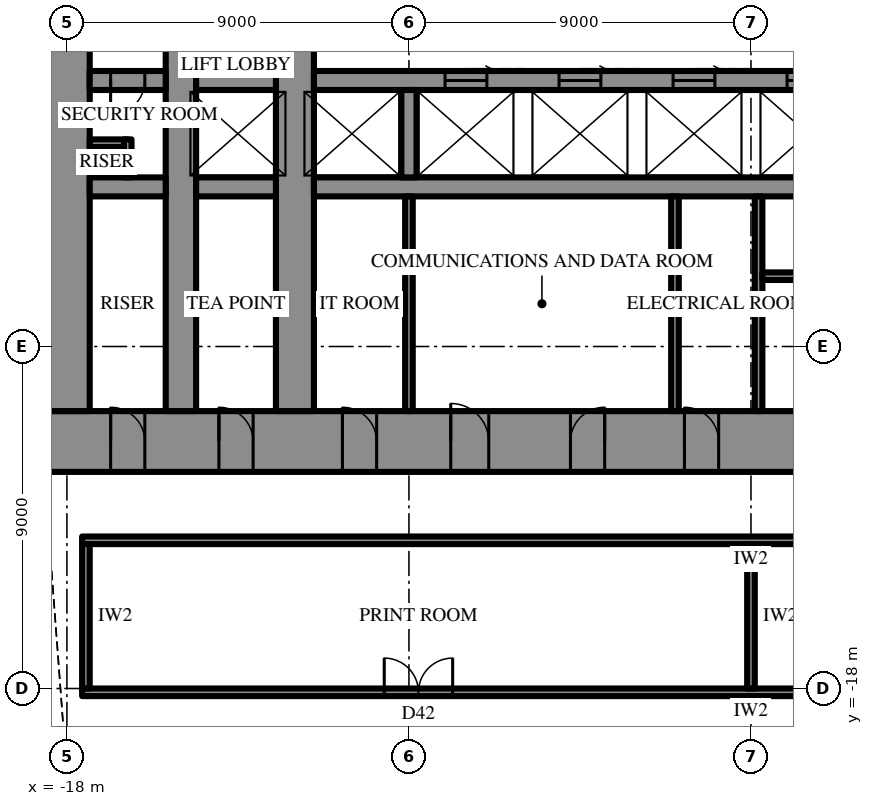
"""IFC4 building model, lengths in metres.
Left out: names, types, materials, properties, quantities, classifications, styles, units other than length and angle.
Written with IfcOpenShell. Run it as: python <this file> out.ifc"""

import sys

from ifc_helpers import new_model, si_unit, direction, frame, frame_2d, origin, place, context, subcontext, project, spatial, rectangle, extrude, element, fill, save


model = new_model("IFC4")
c1 = context("Model", 3, precision=1e-05, world=origin(), true_north=direction((0.0, 1.0)))
c2 = subcontext(c1, "Body", "Model", "MODEL_VIEW")
j1 = project(units=[si_unit("LENGTHUNIT", "METRE"), si_unit("PLANEANGLEUNIT", "RADIAN")], contexts=[c1])
p1 = place(None, origin())
s1 = spatial("IfcSite", under=j1, at=p1, CompositionType="ELEMENT")
p2 = place(p1, origin())
s2 = spatial("IfcBuilding", under=s1, at=p2, CompositionType="ELEMENT")
p3 = place(p2, frame((0.0, 0.0, 199.3)))
s3 = spatial("IfcBuildingStorey", under=s2, at=p3, CompositionType="ELEMENT", Elevation=199.3)
p4 = place(p3, frame((18.6, -11.5, 0.0), z_axis=(0.0, 0.0, 1.0), x_axis=(-1.0, 0.0, 0.0)))
e1 = element("IfcWall", 1, at=p4, inside=s3, PredefinedType="SHEAR", context=c2, shape_type="SweptSolid", body=[
    extrude(rectangle(XDim=37.2, YDim=1.6, at=frame_2d((18.6, 0.0))), origin(), (0.0, 0.0, 1.0), 4.2),
])
p5 = place(p4, frame((19.45, 0.0, 0.0)))
e2 = element("IfcOpeningElement", 2, at=p5, cuts=e1, PredefinedType="OPENING", context=c2, shape_type="SweptSolid", body=[
    extrude(rectangle(XDim=0.9, YDim=2.2, at=frame_2d((0.45, 1.1))), frame((0.0, 0.81, 0.0), z_axis=(0.0, -1.0, 0.0), x_axis=(1.0, 0.0, 0.0)), (0.0, 0.0, 1.0), 1.62),
])
p6 = place(p4, frame((22.45, 0.0, 0.0)))
e3 = element("IfcOpeningElement", 3, at=p6, cuts=e1, PredefinedType="OPENING", context=c2, shape_type="SweptSolid", body=[
    extrude(rectangle(XDim=0.9, YDim=2.2, at=frame_2d((0.45, 1.1))), frame((0.0, 0.81, 0.0), z_axis=(0.0, -1.0, 0.0), x_axis=(1.0, 0.0, 0.0)), (0.0, 0.0, 1.0), 1.62),
])
p7 = place(p4, frame((25.5, 0.0, 0.0)))
e4 = element("IfcOpeningElement", 4, at=p7, cuts=e1, PredefinedType="OPENING", context=c2, shape_type="SweptSolid", body=[
    extrude(rectangle(XDim=1.0, YDim=2.2, at=frame_2d((0.5, 1.1))), frame((0.0, 0.81, 0.0), z_axis=(0.0, -1.0, 0.0), x_axis=(1.0, 0.0, 0.0)), (0.0, 0.0, 1.0), 1.62),
])
p8 = place(p4, frame((1.75, 0.0, 0.0)))
e5 = element("IfcOpeningElement", 5, at=p8, cuts=e1, PredefinedType="OPENING", context=c2, shape_type="SweptSolid", body=[
    extrude(rectangle(XDim=0.9, YDim=2.2, at=frame_2d((0.45, 1.1))), frame((0.0, 0.81, 0.0), z_axis=(0.0, -1.0, 0.0), x_axis=(1.0, 0.0, 0.0)), (0.0, 0.0, 1.0), 1.62),
])
p9 = place(p4, frame((4.6, 0.0, 0.0)))
e6 = element("IfcOpeningElement", 6, at=p9, cuts=e1, PredefinedType="OPENING", context=c2, shape_type="SweptSolid", body=[
    extrude(rectangle(XDim=0.9, YDim=2.2, at=frame_2d((0.45, 1.1))), frame((0.0, 0.81, 0.0), z_axis=(0.0, -1.0, 0.0), x_axis=(1.0, 0.0, 0.0)), (0.0, 0.0, 1.0), 1.62),
])
p10 = place(p4, frame((7.85, 0.0, 0.0)))
e7 = element("IfcOpeningElement", 7, at=p10, cuts=e1, PredefinedType="OPENING", context=c2, shape_type="SweptSolid", body=[
    extrude(rectangle(XDim=0.9, YDim=2.2, at=frame_2d((0.45, 1.1))), frame((0.0, 0.81, 0.0), z_axis=(0.0, -1.0, 0.0), x_axis=(1.0, 0.0, 0.0)), (0.0, 0.0, 1.0), 1.62),
])
p11 = place(p4, frame((28.45, 0.0, 0.0)))
e8 = element("IfcOpeningElement", 8, at=p11, cuts=e1, PredefinedType="OPENING", context=c2, shape_type="SweptSolid", body=[
    extrude(rectangle(XDim=0.9, YDim=2.2, at=frame_2d((0.45, 1.1))), frame((0.0, 0.81, 0.0), z_axis=(0.0, -1.0, 0.0), x_axis=(1.0, 0.0, 0.0)), (0.0, 0.0, 1.0), 1.62),
])
p12 = place(p4, frame((31.7, 0.0, 0.0)))
e9 = element("IfcOpeningElement", 9, at=p12, cuts=e1, PredefinedType="OPENING", context=c2, shape_type="SweptSolid", body=[
    extrude(rectangle(XDim=0.9, YDim=2.2, at=frame_2d((0.45, 1.1))), frame((0.0, 0.81, 0.0), z_axis=(0.0, -1.0, 0.0), x_axis=(1.0, 0.0, 0.0)), (0.0, 0.0, 1.0), 1.62),
])
p13 = place(p4, frame((34.55, 0.0, 0.0)))
e10 = element("IfcOpeningElement", 10, at=p13, cuts=e1, PredefinedType="OPENING", context=c2, shape_type="SweptSolid", body=[
    extrude(rectangle(XDim=0.9, YDim=2.2, at=frame_2d((0.45, 1.1))), frame((0.0, 0.81, 0.0), z_axis=(0.0, -1.0, 0.0), x_axis=(1.0, 0.0, 0.0)), (0.0, 0.0, 1.0), 1.62),
])
p14 = place(p3, frame((-18.0, 10.7, 0.0), z_axis=(0.0, 0.0, 1.0), x_axis=(0.0, -1.0, 0.0)))
e11 = element("IfcWall", 11, at=p14, inside=s3, PredefinedType="SHEAR", context=c2, shape_type="SweptSolid", body=[
    extrude(rectangle(XDim=21.4, YDim=1.2, at=frame_2d((10.7, 0.0))), origin(), (0.0, 0.0, 1.0), 4.2),
])
p15 = place(p14, frame((9.8, 0.0, 0.0)))
e12 = element("IfcOpeningElement", 12, at=p15, cuts=e11, PredefinedType="OPENING", context=c2, shape_type="SweptSolid", body=[
    extrude(rectangle(XDim=1.8, YDim=2.4, at=frame_2d((0.9, 1.2))), frame((0.0, 0.61, 0.0), z_axis=(0.0, -1.0, 0.0), x_axis=(1.0, 0.0, 0.0)), (0.0, 0.0, 1.0), 1.22),
])
p16 = place(p3, frame((-12.0, -10.7, 0.0), z_axis=(0.0, 0.0, 1.0), x_axis=(0.0, 1.0, 0.0)))
e13 = element("IfcWall", 13, at=p16, inside=s3, PredefinedType="SHEAR", context=c2, shape_type="SweptSolid", body=[
    extrude(rectangle(XDim=21.4, YDim=1.0, at=frame_2d((10.7, 0.0))), origin(), (0.0, 0.0, 1.0), 4.2),
])
p17 = place(p16, frame((9.8, 0.0, 0.0)))
e14 = element("IfcOpeningElement", 14, at=p17, cuts=e13, PredefinedType="OPENING", context=c2, shape_type="SweptSolid", body=[
    extrude(rectangle(XDim=1.8, YDim=2.4, at=frame_2d((0.9, 1.2))), frame((0.0, 0.51, 0.0), z_axis=(0.0, -1.0, 0.0), x_axis=(1.0, 0.0, 0.0)), (0.0, 0.0, 1.0), 1.02),
])
p18 = place(p3, frame((-15.0, -10.7, 0.0), z_axis=(0.0, 0.0, 1.0), x_axis=(0.0, 1.0, 0.0)))
e15 = element("IfcWall", 15, at=p18, inside=s3, PredefinedType="SHEAR", context=c2, shape_type="SweptSolid", body=[
    extrude(rectangle(XDim=21.4, YDim=0.8, at=frame_2d((10.7, 0.0))), origin(), (0.0, 0.0, 1.0), 4.2),
])
p19 = place(p18, frame((9.8, 0.0, 0.0)))
e16 = element("IfcOpeningElement", 16, at=p19, cuts=e15, PredefinedType="OPENING", context=c2, shape_type="SweptSolid", body=[
    extrude(rectangle(XDim=1.8, YDim=2.4, at=frame_2d((0.9, 1.2))), frame((0.0, 0.41, 0.0), z_axis=(0.0, -1.0, 0.0), x_axis=(1.0, 0.0, 0.0)), (0.0, 0.0, 1.0), 0.82),
])
p20 = place(p3, frame((3.2, -2.0, 0.0), z_axis=(0.0, 0.0, 1.0), x_axis=(-1.0, 0.0, 0.0)))
e17 = element("IfcWall", 17, at=p20, inside=s3, PredefinedType="SHEAR", context=c2, shape_type="SweptSolid", body=[
    extrude(rectangle(XDim=14.7, YDim=0.5, at=frame_2d((7.35, 0.0))), origin(), (0.0, 0.0, 1.0), 4.2),
])
p21 = place(p20, frame((1.15, 0.0, 0.0)))
e18 = element("IfcOpeningElement", 18, at=p21, cuts=e17, PredefinedType="OPENING", context=c2, shape_type="SweptSolid", body=[
    extrude(rectangle(XDim=1.1, YDim=2.2, at=frame_2d((0.55, 1.1))), frame((0.0, 0.26, 0.0), z_axis=(0.0, -1.0, 0.0), x_axis=(1.0, 0.0, 0.0)), (0.0, 0.0, 1.0), 0.52),
])
p22 = place(p20, frame((4.15, 0.0, 0.0)))
e19 = element("IfcOpeningElement", 19, at=p22, cuts=e17, PredefinedType="OPENING", context=c2, shape_type="SweptSolid", body=[
    extrude(rectangle(XDim=1.1, YDim=2.2, at=frame_2d((0.55, 1.1))), frame((0.0, 0.26, 0.0), z_axis=(0.0, -1.0, 0.0), x_axis=(1.0, 0.0, 0.0)), (0.0, 0.0, 1.0), 0.52),
])
p23 = place(p20, frame((7.15, 0.0, 0.0)))
e20 = element("IfcOpeningElement", 20, at=p23, cuts=e17, PredefinedType="OPENING", context=c2, shape_type="SweptSolid", body=[
    extrude(rectangle(XDim=1.1, YDim=2.2, at=frame_2d((0.55, 1.1))), frame((0.0, 0.26, 0.0), z_axis=(0.0, -1.0, 0.0), x_axis=(1.0, 0.0, 0.0)), (0.0, 0.0, 1.0), 0.52),
])
p24 = place(p20, frame((10.15, 0.0, 0.0)))
e21 = element("IfcOpeningElement", 21, at=p24, cuts=e17, PredefinedType="OPENING", context=c2, shape_type="SweptSolid", body=[
    extrude(rectangle(XDim=1.1, YDim=2.2, at=frame_2d((0.55, 1.1))), frame((0.0, 0.26, 0.0), z_axis=(0.0, -1.0, 0.0), x_axis=(1.0, 0.0, 0.0)), (0.0, 0.0, 1.0), 0.52),
])
p25 = place(p3, frame((-12.5, -2.0, 0.0), z_axis=(0.0, 0.0, 1.0), x_axis=(-1.0, 0.0, 0.0)))
e22 = element("IfcWall", 22, at=p25, inside=s3, PredefinedType="SHEAR", context=c2, shape_type="SweptSolid", body=[
    extrude(rectangle(XDim=2.1, YDim=0.5, at=frame_2d((1.05, 0.0))), origin(), (0.0, 0.0, 1.0), 4.2),
])
p26 = place(p3, frame((-15.4, -2.0, 0.0), z_axis=(0.0, 0.0, 1.0), x_axis=(-1.0, 0.0, 0.0)))
e23 = element("IfcWall", 23, at=p26, inside=s3, PredefinedType="SHEAR", context=c2, shape_type="SweptSolid", body=[
    extrude(rectangle(XDim=2.0, YDim=0.5, at=frame_2d((1.0, 0.0))), origin(), (0.0, 0.0, 1.0), 4.2),
])
p27 = place(p26, frame((0.55, 0.0, 0.0)))
e24 = element("IfcOpeningElement", 24, at=p27, cuts=e23, PredefinedType="OPENING", context=c2, shape_type="SweptSolid", body=[
    extrude(rectangle(XDim=0.9, YDim=2.2, at=frame_2d((0.45, 1.1))), frame((0.0, 0.26, 0.0), z_axis=(0.0, -1.0, 0.0), x_axis=(1.0, 0.0, 0.0)), (0.0, 0.0, 1.0), 0.52),
])
p28 = place(p3, frame((11.5, -4.8, 0.0), z_axis=(0.0, 0.0, 1.0), x_axis=(-1.0, 0.0, 0.0)))
e25 = element("IfcWall", 25, at=p28, inside=s3, PredefinedType="SHEAR", context=c2, shape_type="SweptSolid", body=[
    extrude(rectangle(XDim=23.0, YDim=0.5, at=frame_2d((11.5, 0.0))), origin(), (0.0, 0.0, 1.0), 4.2),
])
p29 = place(p28, frame((6.4, 0.0, 0.0)))
e26 = element("IfcOpeningElement", 26, at=p29, cuts=e25, PredefinedType="OPENING", context=c2, shape_type="SweptSolid", body=[
    extrude(rectangle(XDim=1.2, YDim=2.2, at=frame_2d((0.6, 1.1))), frame((0.0, 0.26, 0.0), z_axis=(0.0, -1.0, 0.0), x_axis=(1.0, 0.0, 0.0)), (0.0, 0.0, 1.0), 0.52),
])
p30 = place(p28, frame((3.4, 0.0, 0.0)))
e27 = element("IfcOpeningElement", 27, at=p30, cuts=e25, PredefinedType="OPENING", context=c2, shape_type="SweptSolid", body=[
    extrude(rectangle(XDim=1.2, YDim=2.2, at=frame_2d((0.6, 1.1))), frame((0.0, 0.26, 0.0), z_axis=(0.0, -1.0, 0.0), x_axis=(1.0, 0.0, 0.0)), (0.0, 0.0, 1.0), 0.52),
])
p31 = place(p3, frame((-12.5, -4.8, 0.0), z_axis=(0.0, 0.0, 1.0), x_axis=(-1.0, 0.0, 0.0)))
e28 = element("IfcWall", 28, at=p31, inside=s3, PredefinedType="SHEAR", context=c2, shape_type="SweptSolid", body=[
    extrude(rectangle(XDim=2.1, YDim=0.5, at=frame_2d((1.05, 0.0))), origin(), (0.0, 0.0, 1.0), 4.2),
])
p32 = place(p3, frame((-15.4, -4.8, 0.0), z_axis=(0.0, 0.0, 1.0), x_axis=(-1.0, 0.0, 0.0)))
e29 = element("IfcWall", 29, at=p32, inside=s3, PredefinedType="SHEAR", context=c2, shape_type="SweptSolid", body=[
    extrude(rectangle(XDim=2.0, YDim=0.5, at=frame_2d((1.0, 0.0))), origin(), (0.0, 0.0, 1.0), 4.2),
])
p33 = place(p3, frame((-9.0, -2.25, 0.0), z_axis=(0.0, 0.0, 1.0), x_axis=(0.0, -1.0, 0.0)))
e30 = element("IfcWall", 30, at=p33, inside=s3, PredefinedType="SHEAR", context=c2, shape_type="SweptSolid", body=[
    extrude(rectangle(XDim=2.3, YDim=0.4, at=frame_2d((1.15, 0.0))), origin(), (0.0, 0.0, 1.0), 4.2),
])
p34 = place(p3, frame((0.2, -5.05, 0.0), z_axis=(0.0, 0.0, 1.0), x_axis=(0.0, -1.0, 0.0)))
e31 = element("IfcWall", 31, at=p34, inside=s3, PredefinedType="SHEAR", context=c2, shape_type="SweptSolid", body=[
    extrude(rectangle(XDim=5.65, YDim=0.2, at=frame_2d((2.825, 0.0))), origin(), (0.0, 0.0, 1.0), 4.2),
])
p35 = place(p3, frame((8.9, -7.15, 0.0), z_axis=(0.0, 0.0, 1.0), x_axis=(-1.0, 0.0, 0.0)))
e32 = element("IfcWall", 32, at=p35, inside=s3, PredefinedType="SHEAR", context=c2, shape_type="SweptSolid", body=[
    extrude(rectangle(XDim=8.6, YDim=0.2, at=frame_2d((4.3, 0.0))), origin(), (0.0, 0.0, 1.0), 4.2),
])
p36 = place(p35, frame((0.3, 0.0, 0.0)))
e33 = element("IfcOpeningElement", 33, at=p36, cuts=e32, PredefinedType="OPENING", context=c2, shape_type="SweptSolid", body=[
    extrude(rectangle(XDim=1.0, YDim=2.2, at=frame_2d((0.5, 1.1))), frame((0.0, 0.11, 0.0), z_axis=(0.0, -1.0, 0.0), x_axis=(1.0, 0.0, 0.0)), (0.0, 0.0, 1.0), 0.22),
])
for number, where, z_axis, x_axis in (
    (34, (-9.0, -5.05, 0.0), (0.0, 0.0, 1.0), (0.0, -1.0, 0.0)),
    (35, (-2.0, -5.05, 0.0), (0.0, 0.0, 1.0), (0.0, -1.0, 0.0)),
):
    element("IfcWall", number, at=place(p3, frame(where, z_axis=z_axis, x_axis=x_axis)), inside=s3, PredefinedType="PARTITIONING", context=c2, shape_type="SweptSolid", body=[
        extrude(rectangle(XDim=5.65, YDim=0.2, at=frame_2d((2.825, 0.0))), origin(), (0.0, 0.0, 1.0), 3.9),
    ])
for number, where, z_axis, x_axis in (
    (36, (-16.4, -3.65, 0.0), (0.0, 0.0, 1.0), (-1.0, 0.0, 0.0)),
    (37, (-16.4, -3.55, 0.0), (0.0, 0.0, 1.0), (0.0, -1.0, 0.0)),
):
    element("IfcWall", number, at=place(p3, frame(where, z_axis=z_axis, x_axis=x_axis)), inside=s3, PredefinedType="PARTITIONING", context=c2, shape_type="SweptSolid", body=[
        extrude(rectangle(XDim=1.0, YDim=0.2, at=frame_2d((0.5, 0.0))), origin(), (0.0, 0.0, 1.0), 3.9),
    ])
p37 = place(p3, frame((17.6, -14.1, 0.0), z_axis=(0.0, 0.0, 1.0), x_axis=(-1.0, 0.0, 0.0)))
e38 = element("IfcWall", 38, at=p37, inside=s3, PredefinedType="PARTITIONING", context=c2, shape_type="SweptSolid", body=[
    extrude(rectangle(XDim=35.2, YDim=0.2, at=frame_2d((17.6, 0.0))), origin(), (0.0, 0.0, 1.0), 3.9),
])
p38 = place(p3, frame((17.6, -18.1, 0.0), z_axis=(0.0, 0.0, 1.0), x_axis=(-1.0, 0.0, 0.0)))
e39 = element("IfcWall", 39, at=p38, inside=s3, PredefinedType="PARTITIONING", context=c2, shape_type="SweptSolid", body=[
    extrude(rectangle(XDim=35.2, YDim=0.2, at=frame_2d((17.6, 0.0))), origin(), (0.0, 0.0, 1.0), 3.9),
])
p39 = place(p38, frame((7.95, 0.0, 0.0)))
e40 = element("IfcOpeningElement", 40, at=p39, cuts=e39, PredefinedType="OPENING", context=c2, shape_type="SweptSolid", body=[
    extrude(rectangle(XDim=1.8, YDim=2.4, at=frame_2d((0.9, 1.2))), frame((0.0, 0.11, 0.0), z_axis=(0.0, -1.0, 0.0), x_axis=(1.0, 0.0, 0.0)), (0.0, 0.0, 1.0), 0.22),
])
p40 = place(p38, frame((25.45, 0.0, 0.0)))
e41 = element("IfcOpeningElement", 41, at=p40, cuts=e39, PredefinedType="OPENING", context=c2, shape_type="SweptSolid", body=[
    extrude(rectangle(XDim=1.8, YDim=2.4, at=frame_2d((0.9, 1.2))), frame((0.0, 0.11, 0.0), z_axis=(0.0, -1.0, 0.0), x_axis=(1.0, 0.0, 0.0)), (0.0, 0.0, 1.0), 0.22),
])
p41 = place(p3, frame((0.0, -14.2, 0.0), z_axis=(0.0, 0.0, 1.0), x_axis=(0.0, -1.0, 0.0)))
e42 = element("IfcWall", 42, at=p41, inside=s3, PredefinedType="PARTITIONING", context=c2, shape_type="SweptSolid", body=[
    extrude(rectangle(XDim=3.8, YDim=0.2, at=frame_2d((1.9, 0.0))), origin(), (0.0, 0.0, 1.0), 2.844),
])
p42 = place(p3, frame((-17.5, -14.2, 0.0), z_axis=(0.0, 0.0, 1.0), x_axis=(0.0, -1.0, 0.0)))
e43 = element("IfcWall", 43, at=p42, inside=s3, PredefinedType="PARTITIONING", context=c2, shape_type="SweptSolid", body=[
    extrude(rectangle(XDim=3.8, YDim=0.2, at=frame_2d((1.9, 0.0))), origin(), (0.0, 0.0, 1.0), 3.9),
])
p43 = place(p5, frame((0.9, 0.0, 0.0), z_axis=(0.0, 0.0, 1.0), x_axis=(-1.0, 0.0, 0.0)))
e44 = element("IfcDoor", 44, at=p43, inside=s3, OperationType="SINGLE_SWING_RIGHT", PredefinedType="DOOR", context=c2, shape_type="SweptSolid", body=[
    extrude(rectangle(XDim=0.9, YDim=2.2, at=frame_2d((0.45, 1.1))), frame((0.0, 0.025, 0.0), z_axis=(0.0, -1.0, 0.0), x_axis=(1.0, 0.0, 0.0)), (0.0, 0.0, 1.0), 0.05),
])
fill(e2, e44)
p44 = place(p6, frame((0.9, 0.0, 0.0), z_axis=(0.0, 0.0, 1.0), x_axis=(-1.0, 0.0, 0.0)))
e45 = element("IfcDoor", 45, at=p44, inside=s3, OperationType="SINGLE_SWING_LEFT", PredefinedType="DOOR", context=c2, shape_type="SweptSolid", body=[
    extrude(rectangle(XDim=0.9, YDim=2.2, at=frame_2d((0.45, 1.1))), frame((0.0, 0.025, 0.0), z_axis=(0.0, -1.0, 0.0), x_axis=(1.0, 0.0, 0.0)), (0.0, 0.0, 1.0), 0.05),
])
fill(e3, e45)
p45 = place(p7, frame((1.0, 0.0, 0.0), z_axis=(0.0, 0.0, 1.0), x_axis=(-1.0, 0.0, 0.0)))
e46 = element("IfcDoor", 46, at=p45, inside=s3, OperationType="SINGLE_SWING_RIGHT", PredefinedType="DOOR", context=c2, shape_type="SweptSolid", body=[
    extrude(rectangle(XDim=1.0, YDim=2.2, at=frame_2d((0.5, 1.1))), frame((0.0, 0.025, 0.0), z_axis=(0.0, -1.0, 0.0), x_axis=(1.0, 0.0, 0.0)), (0.0, 0.0, 1.0), 0.05),
])
fill(e4, e46)
p46 = place(p11, frame((0.9, 0.0, 0.0), z_axis=(0.0, 0.0, 1.0), x_axis=(-1.0, 0.0, 0.0)))
e47 = element("IfcDoor", 47, at=p46, inside=s3, OperationType="SINGLE_SWING_RIGHT", PredefinedType="DOOR", context=c2, shape_type="SweptSolid", body=[
    extrude(rectangle(XDim=0.9, YDim=2.2, at=frame_2d((0.45, 1.1))), frame((0.0, 0.025, 0.0), z_axis=(0.0, -1.0, 0.0), x_axis=(1.0, 0.0, 0.0)), (0.0, 0.0, 1.0), 0.05),
])
fill(e8, e47)
p47 = place(p12, frame((0.9, 0.0, 0.0), z_axis=(0.0, 0.0, 1.0), x_axis=(-1.0, 0.0, 0.0)))
e48 = element("IfcDoor", 48, at=p47, inside=s3, OperationType="SINGLE_SWING_RIGHT", PredefinedType="DOOR", context=c2, shape_type="SweptSolid", body=[
    extrude(rectangle(XDim=0.9, YDim=2.2, at=frame_2d((0.45, 1.1))), frame((0.0, 0.025, 0.0), z_axis=(0.0, -1.0, 0.0), x_axis=(1.0, 0.0, 0.0)), (0.0, 0.0, 1.0), 0.05),
])
fill(e9, e48)
p48 = place(p13, frame((0.9, 0.0, 0.0), z_axis=(0.0, 0.0, 1.0), x_axis=(-1.0, 0.0, 0.0)))
e49 = element("IfcDoor", 49, at=p48, inside=s3, OperationType="SINGLE_SWING_RIGHT", PredefinedType="DOOR", context=c2, shape_type="SweptSolid", body=[
    extrude(rectangle(XDim=0.9, YDim=2.2, at=frame_2d((0.45, 1.1))), frame((0.0, 0.025, 0.0), z_axis=(0.0, -1.0, 0.0), x_axis=(1.0, 0.0, 0.0)), (0.0, 0.0, 1.0), 0.05),
])
fill(e10, e49)
p49 = place(p27, origin())
e50 = element("IfcDoor", 50, at=p49, inside=s3, OperationType="SINGLE_SWING_LEFT", PredefinedType="DOOR", context=c2, shape_type="SweptSolid", body=[
    extrude(rectangle(XDim=0.9, YDim=2.2, at=frame_2d((0.45, 1.1))), frame((0.0, 0.025, 0.0), z_axis=(0.0, -1.0, 0.0), x_axis=(1.0, 0.0, 0.0)), (0.0, 0.0, 1.0), 0.05),
])
fill(e24, e50)
p50 = place(p21, frame((1.1, 0.0, 0.0), z_axis=(0.0, 0.0, 1.0), x_axis=(-1.0, 0.0, 0.0)))
e51 = element("IfcDoor", 51, at=p50, inside=s3, OperationType="SLIDING_TO_LEFT", PredefinedType="DOOR", context=c2, shape_type="SweptSolid", body=[
    extrude(rectangle(XDim=1.1, YDim=2.2, at=frame_2d((0.55, 1.1))), frame((0.0, 0.025, 0.0), z_axis=(0.0, -1.0, 0.0), x_axis=(1.0, 0.0, 0.0)), (0.0, 0.0, 1.0), 0.05),
])
fill(e18, e51)
p51 = place(p22, frame((1.1, 0.0, 0.0), z_axis=(0.0, 0.0, 1.0), x_axis=(-1.0, 0.0, 0.0)))
e52 = element("IfcDoor", 52, at=p51, inside=s3, OperationType="SLIDING_TO_LEFT", PredefinedType="DOOR", context=c2, shape_type="SweptSolid", body=[
    extrude(rectangle(XDim=1.1, YDim=2.2, at=frame_2d((0.55, 1.1))), frame((0.0, 0.025, 0.0), z_axis=(0.0, -1.0, 0.0), x_axis=(1.0, 0.0, 0.0)), (0.0, 0.0, 1.0), 0.05),
])
fill(e19, e52)
p52 = place(p23, frame((1.1, 0.0, 0.0), z_axis=(0.0, 0.0, 1.0), x_axis=(-1.0, 0.0, 0.0)))
e53 = element("IfcDoor", 53, at=p52, inside=s3, OperationType="SLIDING_TO_LEFT", PredefinedType="DOOR", context=c2, shape_type="SweptSolid", body=[
    extrude(rectangle(XDim=1.1, YDim=2.2, at=frame_2d((0.55, 1.1))), frame((0.0, 0.025, 0.0), z_axis=(0.0, -1.0, 0.0), x_axis=(1.0, 0.0, 0.0)), (0.0, 0.0, 1.0), 0.05),
])
fill(e20, e53)
p53 = place(p24, frame((1.1, 0.0, 0.0), z_axis=(0.0, 0.0, 1.0), x_axis=(-1.0, 0.0, 0.0)))
e54 = element("IfcDoor", 54, at=p53, inside=s3, OperationType="SLIDING_TO_LEFT", PredefinedType="DOOR", context=c2, shape_type="SweptSolid", body=[
    extrude(rectangle(XDim=1.1, YDim=2.2, at=frame_2d((0.55, 1.1))), frame((0.0, 0.025, 0.0), z_axis=(0.0, -1.0, 0.0), x_axis=(1.0, 0.0, 0.0)), (0.0, 0.0, 1.0), 0.05),
])
fill(e21, e54)
p54 = place(p40, frame((1.8, 0.0, 0.0), z_axis=(0.0, 0.0, 1.0), x_axis=(-1.0, 0.0, 0.0)))
e55 = element("IfcDoor", 55, at=p54, inside=s3, OperationType="DOUBLE_DOOR_SINGLE_SWING", PredefinedType="DOOR", context=c2, shape_type="SweptSolid", body=[
    extrude(rectangle(XDim=1.8, YDim=2.4, at=frame_2d((0.9, 1.2))), frame((0.0, 0.025, 0.0), z_axis=(0.0, -1.0, 0.0), x_axis=(1.0, 0.0, 0.0)), (0.0, 0.0, 1.0), 0.05),
])
fill(e41, e55)
save(model, sys.argv[1])
